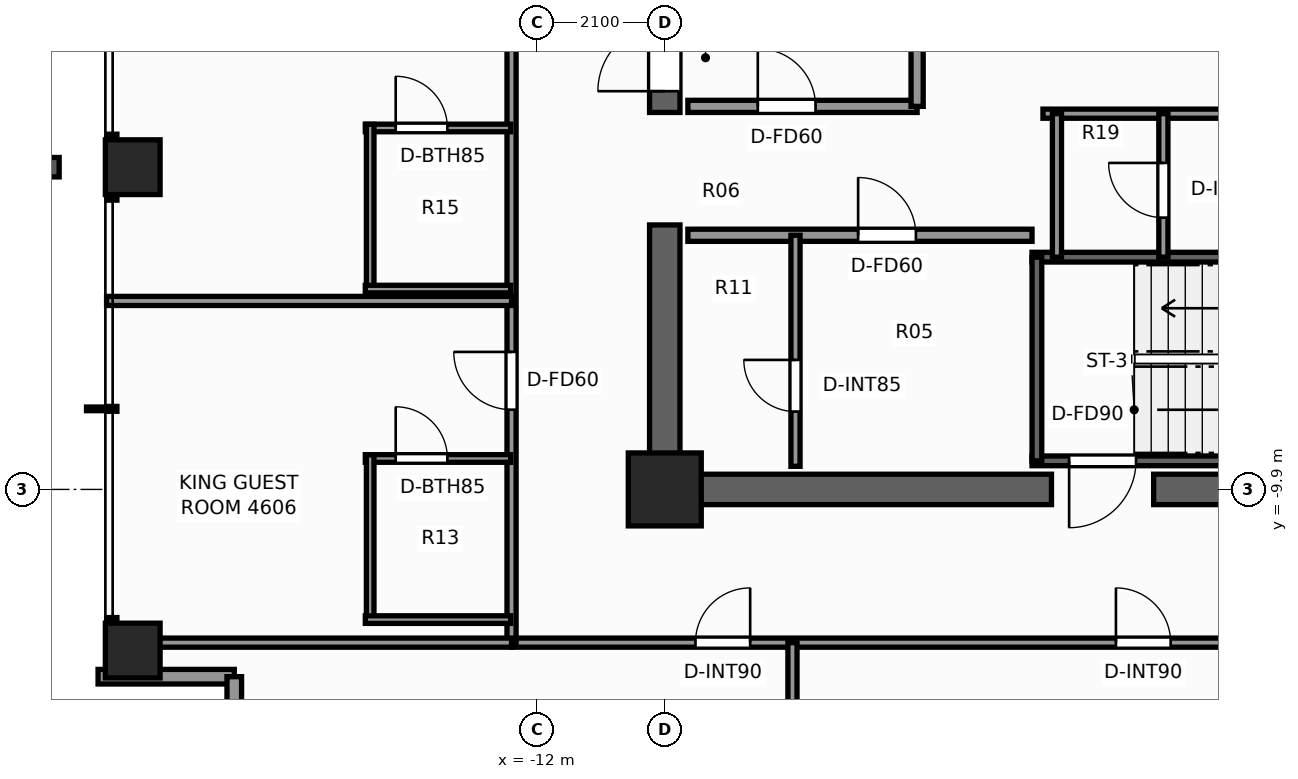
"""IFC4 building model, lengths in metres.
Left out: names, types, materials, properties, quantities, classifications, styles, units other than length and angle.
Written with IfcOpenShell. Run it as: python <this file> out.ifc"""

import sys

from ifc_helpers import new_model, si_unit, direction, frame, frame_2d, origin, origin_2d, place, context, subcontext, project, spatial, rectangle, extrude, element, fill, save


model = new_model("IFC4")
c1 = context("Model", 3, precision=1e-05, world=origin(), true_north=direction((0.0, 1.0)))
c2 = subcontext(c1, "Body", "Model", "MODEL_VIEW")
j1 = project(units=[si_unit("LENGTHUNIT", "METRE"), si_unit("PLANEANGLEUNIT", "RADIAN")], contexts=[c1])
p1 = place(None, origin())
s1 = spatial("IfcSite", under=j1, at=p1, CompositionType="ELEMENT")
p2 = place(p1, origin())
s2 = spatial("IfcBuilding", under=s1, at=p2, CompositionType="ELEMENT")
p3 = place(p2, frame((0.0, 0.0, 160.2)))
s3 = spatial("IfcBuildingStorey", under=s2, at=p3, CompositionType="ELEMENT", Elevation=160.2)
p4 = place(p3, frame((10.15, -9.9, 0.0), z_axis=(0.0, 0.0, 1.0), x_axis=(-1.0, 0.0, 0.0)))
e1 = element("IfcWall", 1, at=p4, inside=s3, PredefinedType="SHEAR", context=c2, shape_type="SweptSolid", body=[
    extrude(rectangle(XDim=12.01, YDim=0.5, at=frame_2d((6.005, 0.0))), origin(), (0.0, 0.0, 1.0), 3.3),
])
p5 = place(p3, frame((-3.54, -9.9, 0.0), z_axis=(0.0, 0.0, 1.0), x_axis=(-1.0, 0.0, 0.0)))
e2 = element("IfcWall", 2, at=p5, inside=s3, PredefinedType="SHEAR", context=c2, shape_type="SweptSolid", body=[
    extrude(rectangle(XDim=6.61, YDim=0.5, at=frame_2d((3.305, 0.0))), origin(), (0.0, 0.0, 1.0), 3.3),
])
p6 = place(p3, frame((-9.9, -9.65, 0.0), z_axis=(0.0, 0.0, 1.0), x_axis=(0.0, 1.0, 0.0)))
e3 = element("IfcWall", 3, at=p6, inside=s3, PredefinedType="SHEAR", context=c2, shape_type="SweptSolid", body=[
    extrude(rectangle(XDim=4.1, YDim=0.5, at=frame_2d((2.05, 0.0))), origin(), (0.0, 0.0, 1.0), 3.3),
])
p7 = place(p3, frame((-9.9, -3.7, 0.0), z_axis=(0.0, 0.0, 1.0), x_axis=(0.0, 1.0, 0.0)))
e4 = element("IfcWall", 4, at=p7, inside=s3, PredefinedType="SHEAR", context=c2, shape_type="SweptSolid", body=[
    extrude(rectangle(XDim=13.35, YDim=0.5, at=frame_2d((6.675, 0.0))), origin(), (0.0, 0.0, 1.0), 3.3),
])
p8 = place(p7, frame((0.35, 0.0, 0.0)))
e5 = element("IfcOpeningElement", 5, at=p8, cuts=e4, PredefinedType="OPENING", context=c2, shape_type="SweptSolid", body=[
    extrude(rectangle(XDim=1.1, YDim=2.2, at=frame_2d((0.55, 1.1))), frame((0.0, 0.26, 0.0), z_axis=(0.0, -1.0, 0.0), x_axis=(1.0, 0.0, 0.0)), (0.0, 0.0, 1.0), 0.52),
])
p9 = place(p3, frame((-9.9, -9.9, 0.0), z_axis=(0.0, 0.0, 1.0), x_axis=(1.0, 0.0, 0.0)))
e6 = element("IfcColumn", 6, at=p9, inside=s3, PredefinedType="COLUMN", context=c2, shape_type="SweptSolid", body=[
    extrude(rectangle(XDim=1.2, YDim=1.2, at=origin_2d()), origin(), (0.0, 0.0, 1.0), 3.3),
])
for number, where, z_axis, x_axis in (
    (7, (-18.65, -12.55, 0.0), (0.0, 0.0, 1.0), (1.0, 0.0, 0.0)),
    (8, (-18.65, -4.6, 0.0), (0.0, 0.0, 1.0), (1.0, 0.0, 0.0)),
):
    element("IfcColumn", number, at=place(p3, frame(where, z_axis=z_axis, x_axis=x_axis)), inside=s3, PredefinedType="COLUMN", context=c2, shape_type="SweptSolid", body=[
        extrude(rectangle(XDim=0.9, YDim=0.9, at=origin_2d()), origin(), (0.0, 0.0, 1.0), 3.3),
    ])
p10 = place(p3, frame((-16.98, -12.98, 0.0), z_axis=(0.0, 0.0, 1.0), x_axis=(-1.0, 0.0, 0.0)))
e9 = element("IfcWall", 9, at=p10, inside=s3, PredefinedType="STANDARD", context=c2, shape_type="SweptSolid", body=[
    extrude(rectangle(XDim=2.24, YDim=0.24, at=frame_2d((1.12, 0.0))), origin(), (0.0, 0.0, 1.0), 2.483),
])
p11 = place(p3, frame((-16.98, -15.22, 0.0), z_axis=(0.0, 0.0, 1.0), x_axis=(0.0, 1.0, 0.0)))
e10 = element("IfcWall", 10, at=p11, inside=s3, PredefinedType="STANDARD", context=c2, shape_type="SweptSolid", body=[
    extrude(rectangle(XDim=2.24, YDim=0.24, at=frame_2d((1.12, 0.0))), origin(), (0.0, 0.0, 1.0), 2.483),
])
p12 = place(p11, frame((0.45, 0.0, 0.65)))
e11 = element("IfcOpeningElement", 11, at=p12, cuts=e10, PredefinedType="OPENING", context=c2, shape_type="SweptSolid", body=[
    extrude(rectangle(XDim=1.1, YDim=1.45, at=frame_2d((0.55, 0.725))), frame((0.0, 0.13, 0.0), z_axis=(0.0, -1.0, 0.0), x_axis=(1.0, 0.0, 0.0)), (0.0, 0.0, 1.0), 0.26),
])
p13 = place(p3, frame((3.86, -9.43, 0.0), z_axis=(0.0, 0.0, 1.0), x_axis=(-1.0, 0.0, 0.0)))
e12 = element("IfcWall", 12, at=p13, inside=s3, PredefinedType="SHEAR", context=c2, shape_type="SweptSolid", body=[
    extrude(rectangle(XDim=7.72, YDim=0.16, at=frame_2d((3.86, 0.0))), origin(), (0.0, 0.0, 1.0), 3.3),
])
p14 = place(p13, frame((6.01, 0.0, 0.0)))
e13 = element("IfcOpeningElement", 13, at=p14, cuts=e12, PredefinedType="OPENING", context=c2, shape_type="SweptSolid", body=[
    extrude(rectangle(XDim=1.1, YDim=2.2, at=frame_2d((0.55, 1.1))), frame((0.0, 0.09, 0.0), z_axis=(0.0, -1.0, 0.0), x_axis=(1.0, 0.0, 0.0)), (0.0, 0.0, 1.0), 0.18),
])
p15 = place(p3, frame((-3.86, -6.08, 0.0), z_axis=(0.0, 0.0, 1.0), x_axis=(1.0, 0.0, 0.0)))
e14 = element("IfcWall", 14, at=p15, inside=s3, PredefinedType="SHEAR", context=c2, shape_type="SweptSolid", body=[
    extrude(rectangle(XDim=7.72, YDim=0.16, at=frame_2d((3.86, 0.0))), origin(), (0.0, 0.0, 1.0), 3.3),
])
p16 = place(p3, frame((-3.78, -9.43, 0.0), z_axis=(0.0, 0.0, 1.0), x_axis=(0.0, 1.0, 0.0)))
e15 = element("IfcWall", 15, at=p16, inside=s3, PredefinedType="SHEAR", context=c2, shape_type="SweptSolid", body=[
    extrude(rectangle(XDim=3.35, YDim=0.16, at=frame_2d((1.675, 0.0))), origin(), (0.0, 0.0, 1.0), 3.3),
])
p17 = place(p3, frame((-9.52, -3.6, 0.0), z_axis=(0.0, 0.0, 1.0), x_axis=(1.0, 0.0, 0.0)))
e16 = element("IfcWall", 16, at=p17, inside=s3, PredefinedType="SOLIDWALL", context=c2, shape_type="SweptSolid", body=[
    extrude(rectangle(XDim=3.77, YDim=0.2, at=frame_2d((1.885, 0.0))), origin(), (0.0, 0.0, 1.0), 3.1),
])
p18 = place(p17, frame((1.15, 0.0, 0.0)))
e17 = element("IfcOpeningElement", 17, at=p18, cuts=e16, PredefinedType="OPENING", context=c2, shape_type="SweptSolid", body=[
    extrude(rectangle(XDim=0.95, YDim=2.06, at=frame_2d((0.475, 1.03))), frame((0.0, 0.11, 0.0), z_axis=(0.0, -1.0, 0.0), x_axis=(1.0, 0.0, 0.0)), (0.0, 0.0, 1.0), 0.22),
])
p19 = place(p3, frame((-5.75, -3.6, 0.0), z_axis=(0.0, 0.0, 1.0), x_axis=(0.0, 1.0, 0.0)))
e18 = element("IfcWall", 18, at=p19, inside=s3, PredefinedType="SOLIDWALL", context=c2, shape_type="SweptSolid", body=[
    extrude(rectangle(XDim=5.57, YDim=0.2, at=frame_2d((2.785, 0.0))), origin(), (0.0, 0.0, 1.0), 2.735),
])
p20 = place(p19, frame((2.75, 0.0, 0.0)))
e19 = element("IfcOpeningElement", 19, at=p20, cuts=e18, PredefinedType="OPENING", context=c2, shape_type="SweptSolid", body=[
    extrude(rectangle(XDim=1.1, YDim=2.2, at=frame_2d((0.55, 1.1))), frame((0.0, 0.11, 0.0), z_axis=(0.0, -1.0, 0.0), x_axis=(1.0, 0.0, 0.0)), (0.0, 0.0, 1.0), 0.22),
])
p21 = place(p3, frame((-9.52, -5.72, 0.0), z_axis=(0.0, 0.0, 1.0), x_axis=(1.0, 0.0, 0.0)))
e20 = element("IfcWall", 20, at=p21, inside=s3, PredefinedType="SOLIDWALL", context=c2, shape_type="SweptSolid", body=[
    extrude(rectangle(XDim=5.66, YDim=0.2, at=frame_2d((2.83, 0.0))), origin(), (0.0, 0.0, 1.0), 3.1),
])
p22 = place(p21, frame((2.8, 0.0, 0.0)))
e21 = element("IfcOpeningElement", 21, at=p22, cuts=e20, PredefinedType="OPENING", context=c2, shape_type="SweptSolid", body=[
    extrude(rectangle(XDim=0.95, YDim=2.06, at=frame_2d((0.475, 1.03))), frame((0.0, 0.11, 0.0), z_axis=(0.0, -1.0, 0.0), x_axis=(1.0, 0.0, 0.0)), (0.0, 0.0, 1.0), 0.22),
])
p23 = place(p3, frame((-7.75, -9.52, 0.0), z_axis=(0.0, 0.0, 1.0), x_axis=(0.0, 1.0, 0.0)))
e22 = element("IfcWall", 22, at=p23, inside=s3, PredefinedType="PARTITIONING", context=c2, shape_type="SweptSolid", body=[
    extrude(rectangle(XDim=3.8, YDim=0.15, at=frame_2d((1.9, 0.0))), origin(), (0.0, 0.0, 1.0), 3.1),
])
p24 = place(p23, frame((0.9, 0.0, 0.0)))
e23 = element("IfcOpeningElement", 23, at=p24, cuts=e22, PredefinedType="OPENING", context=c2, shape_type="SweptSolid", body=[
    extrude(rectangle(XDim=0.85, YDim=2.03, at=frame_2d((0.425, 1.015))), frame((0.0, 0.085, 0.0), z_axis=(0.0, -1.0, 0.0), x_axis=(1.0, 0.0, 0.0)), (0.0, 0.0, 1.0), 0.17),
])
p25 = place(p3, frame((-3.68, -3.72, 0.0), z_axis=(0.0, 0.0, 1.0), x_axis=(1.0, 0.0, 0.0)))
e24 = element("IfcWall", 24, at=p25, inside=s3, PredefinedType="PARTITIONING", context=c2, shape_type="SweptSolid", body=[
    extrude(rectangle(XDim=7.36, YDim=0.15, at=frame_2d((3.68, 0.0))), origin(), (0.0, 0.0, 1.0), 3.1),
])
p26 = place(p3, frame((-3.45, -6.08, 0.0), z_axis=(0.0, 0.0, 1.0), x_axis=(0.0, 1.0, 0.0)))
e25 = element("IfcWall", 25, at=p26, inside=s3, PredefinedType="PARTITIONING", context=c2, shape_type="SweptSolid", body=[
    extrude(rectangle(XDim=2.36, YDim=0.15, at=frame_2d((1.18, 0.0))), origin(), (0.0, 0.0, 1.0), 3.1),
])
p27 = place(p3, frame((-1.7, -6.08, 0.0), z_axis=(0.0, 0.0, 1.0), x_axis=(0.0, 1.0, 0.0)))
e26 = element("IfcWall", 26, at=p27, inside=s3, PredefinedType="PARTITIONING", context=c2, shape_type="SweptSolid", body=[
    extrude(rectangle(XDim=2.36, YDim=0.15, at=frame_2d((1.18, 0.0))), origin(), (0.0, 0.0, 1.0), 3.1),
])
p28 = place(p27, frame((0.65, 0.0, 0.0)))
e27 = element("IfcOpeningElement", 27, at=p28, cuts=e26, PredefinedType="OPENING", context=c2, shape_type="SweptSolid", body=[
    extrude(rectangle(XDim=0.9, YDim=2.06, at=frame_2d((0.45, 1.03))), frame((0.0, 0.085, 0.0), z_axis=(0.0, -1.0, 0.0), x_axis=(1.0, 0.0, 0.0)), (0.0, 0.0, 1.0), 0.17),
])
p29 = place(p3, frame((-12.42, -12.42, 0.0), z_axis=(0.0, 0.0, 1.0), x_axis=(1.0, 0.0, 0.0)))
e28 = element("IfcWall", 28, at=p29, inside=s3, PredefinedType="PARTITIONING", context=c2, shape_type="SweptSolid", body=[
    extrude(rectangle(XDim=24.84, YDim=0.15, at=frame_2d((12.42, 0.0))), origin(), (0.0, 0.0, 1.0), 2.389),
])
p30 = place(p29, frame((3.024, 0.0, 0.0)))
e29 = element("IfcOpeningElement", 29, at=p30, cuts=e28, PredefinedType="OPENING", context=c2, shape_type="SweptSolid", body=[
    extrude(rectangle(XDim=0.9, YDim=2.06, at=frame_2d((0.45, 1.03))), frame((0.0, 0.085, 0.0), z_axis=(0.0, -1.0, 0.0), x_axis=(1.0, 0.0, 0.0)), (0.0, 0.0, 1.0), 0.17),
])
p31 = place(p29, frame((9.94, 0.0, 0.0)))
e30 = element("IfcOpeningElement", 30, at=p31, cuts=e28, PredefinedType="OPENING", context=c2, shape_type="SweptSolid", body=[
    extrude(rectangle(XDim=0.9, YDim=2.06, at=frame_2d((0.45, 1.03))), frame((0.0, 0.085, 0.0), z_axis=(0.0, -1.0, 0.0), x_axis=(1.0, 0.0, 0.0)), (0.0, 0.0, 1.0), 0.17),
])
p32 = place(p29, frame((15.224, 0.0, 0.0)))
e31 = element("IfcOpeningElement", 31, at=p32, cuts=e28, PredefinedType="OPENING", context=c2, shape_type="SweptSolid", body=[
    extrude(rectangle(XDim=0.9, YDim=2.06, at=frame_2d((0.45, 1.03))), frame((0.0, 0.085, 0.0), z_axis=(0.0, -1.0, 0.0), x_axis=(1.0, 0.0, 0.0)), (0.0, 0.0, 1.0), 0.17),
])
p33 = place(p29, frame((18.466, 0.0, 0.0)))
e32 = element("IfcOpeningElement", 32, at=p33, cuts=e28, PredefinedType="OPENING", context=c2, shape_type="SweptSolid", body=[
    extrude(rectangle(XDim=0.95, YDim=2.06, at=frame_2d((0.475, 1.03))), frame((0.0, 0.085, 0.0), z_axis=(0.0, -1.0, 0.0), x_axis=(1.0, 0.0, 0.0)), (0.0, 0.0, 1.0), 0.17),
])
p34 = place(p29, frame((20.916, 0.0, 0.0)))
e33 = element("IfcOpeningElement", 33, at=p34, cuts=e28, PredefinedType="OPENING", context=c2, shape_type="SweptSolid", body=[
    extrude(rectangle(XDim=0.9, YDim=2.06, at=frame_2d((0.45, 1.03))), frame((0.0, 0.085, 0.0), z_axis=(0.0, -1.0, 0.0), x_axis=(1.0, 0.0, 0.0)), (0.0, 0.0, 1.0), 0.17),
])
p35 = place(p3, frame((-12.42, -12.42, 0.0), z_axis=(0.0, 0.0, 1.0), x_axis=(0.0, 1.0, 0.0)))
e34 = element("IfcWall", 34, at=p35, inside=s3, PredefinedType="PARTITIONING", context=c2, shape_type="SweptSolid", body=[
    extrude(rectangle(XDim=24.84, YDim=0.15, at=frame_2d((12.42, 0.0))), origin(), (0.0, 0.0, 1.0), 2.389),
])
p36 = place(p35, frame((3.831, 0.0, 0.0)))
e35 = element("IfcOpeningElement", 35, at=p36, cuts=e34, PredefinedType="OPENING", context=c2, shape_type="SweptSolid", body=[
    extrude(rectangle(XDim=0.95, YDim=2.06, at=frame_2d((0.475, 1.03))), frame((0.0, 0.085, 0.0), z_axis=(0.0, -1.0, 0.0), x_axis=(1.0, 0.0, 0.0)), (0.0, 0.0, 1.0), 0.17),
])
p37 = place(p35, frame((10.012, 0.0, 0.0)))
e36 = element("IfcOpeningElement", 36, at=p37, cuts=e34, PredefinedType="OPENING", context=c2, shape_type="SweptSolid", body=[
    extrude(rectangle(XDim=0.95, YDim=2.06, at=frame_2d((0.475, 1.03))), frame((0.0, 0.085, 0.0), z_axis=(0.0, -1.0, 0.0), x_axis=(1.0, 0.0, 0.0)), (0.0, 0.0, 1.0), 0.17),
])
p38 = place(p35, frame((19.504, 0.0, 0.0)))
e37 = element("IfcOpeningElement", 37, at=p38, cuts=e34, PredefinedType="OPENING", context=c2, shape_type="SweptSolid", body=[
    extrude(rectangle(XDim=0.95, YDim=2.06, at=frame_2d((0.475, 1.03))), frame((0.0, 0.085, 0.0), z_axis=(0.0, -1.0, 0.0), x_axis=(1.0, 0.0, 0.0)), (0.0, 0.0, 1.0), 0.17),
])
p39 = place(p3, frame((-19.08, -12.42, 0.0), z_axis=(0.0, 0.0, 1.0), x_axis=(1.0, 0.0, 0.0)))
e38 = element("IfcWall", 38, at=p39, inside=s3, PredefinedType="PARTITIONING", context=c2, shape_type="SweptSolid", body=[
    extrude(rectangle(XDim=6.66, YDim=0.15, at=frame_2d((3.33, 0.0))), origin(), (0.0, 0.0, 1.0), 2.389),
])
for number, where, z_axis, x_axis in (
    (39, (-7.8, -19.08, 0.0), (0.0, 0.0, 1.0), (0.0, 1.0, 0.0)),
    (40, (-19.08, -6.8, 0.0), (0.0, 0.0, 1.0), (1.0, 0.0, 0.0)),
):
    element("IfcWall", number, at=place(p3, frame(where, z_axis=z_axis, x_axis=x_axis)), inside=s3, PredefinedType="PARTITIONING", context=c2, shape_type="SweptSolid", body=[
        extrude(rectangle(XDim=6.66, YDim=0.15, at=frame_2d((3.33, 0.0))), origin(), (0.0, 0.0, 1.0), 2.473),
    ])
p40 = place(p3, frame((-14.825, -9.391, 0.0), z_axis=(0.0, 0.0, 1.0), x_axis=(1.0, 0.0, 0.0)))
e41 = element("IfcWall", 41, at=p40, inside=s3, PredefinedType="PARTITIONING", context=c2, shape_type="SweptSolid", body=[
    extrude(rectangle(XDim=2.39, YDim=0.125, at=frame_2d((1.195, 0.0))), origin(), (0.0, 0.0, 1.0), 3.1),
])
p41 = place(p40, frame((0.5, 0.0, 0.0)))
e42 = element("IfcOpeningElement", 42, at=p41, cuts=e41, PredefinedType="OPENING", context=c2, shape_type="SweptSolid", body=[
    extrude(rectangle(XDim=0.85, YDim=2.03, at=frame_2d((0.425, 1.015))), frame((0.0, 0.073, 0.0), z_axis=(0.0, -1.0, 0.0), x_axis=(1.0, 0.0, 0.0)), (0.0, 0.0, 1.0), 0.145),
])
p42 = place(p3, frame((-14.745, -12.101, 0.0), z_axis=(0.0, 0.0, 1.0), x_axis=(0.0, 1.0, 0.0)))
e43 = element("IfcWall", 43, at=p42, inside=s3, PredefinedType="PARTITIONING", context=c2, shape_type="SweptSolid", body=[
    extrude(rectangle(XDim=2.77, YDim=0.125, at=frame_2d((1.385, 0.0))), origin(), (0.0, 0.0, 1.0), 2.389),
])
p43 = place(p3, frame((-14.825, -12.041, 0.0), z_axis=(0.0, 0.0, 1.0), x_axis=(1.0, 0.0, 0.0)))
e44 = element("IfcWall", 44, at=p43, inside=s3, PredefinedType="PARTITIONING", context=c2, shape_type="SweptSolid", body=[
    extrude(rectangle(XDim=2.39, YDim=0.125, at=frame_2d((1.195, 0.0))), origin(), (0.0, 0.0, 1.0), 3.1),
])
p44 = place(p3, frame((-14.825, -3.955, 0.0), z_axis=(0.0, 0.0, 1.0), x_axis=(1.0, 0.0, 0.0)))
e45 = element("IfcWall", 45, at=p44, inside=s3, PredefinedType="PARTITIONING", context=c2, shape_type="SweptSolid", body=[
    extrude(rectangle(XDim=2.39, YDim=0.125, at=frame_2d((1.195, 0.0))), origin(), (0.0, 0.0, 1.0), 3.1),
])
p45 = place(p44, frame((0.5, 0.0, 0.0)))
e46 = element("IfcOpeningElement", 46, at=p45, cuts=e45, PredefinedType="OPENING", context=c2, shape_type="SweptSolid", body=[
    extrude(rectangle(XDim=0.85, YDim=2.03, at=frame_2d((0.425, 1.015))), frame((0.0, 0.073, 0.0), z_axis=(0.0, -1.0, 0.0), x_axis=(1.0, 0.0, 0.0)), (0.0, 0.0, 1.0), 0.145),
])
p46 = place(p3, frame((-14.745, -6.665, 0.0), z_axis=(0.0, 0.0, 1.0), x_axis=(0.0, 1.0, 0.0)))
e47 = element("IfcWall", 47, at=p46, inside=s3, PredefinedType="PARTITIONING", context=c2, shape_type="SweptSolid", body=[
    extrude(rectangle(XDim=2.77, YDim=0.125, at=frame_2d((1.385, 0.0))), origin(), (0.0, 0.0, 1.0), 2.389),
])
p47 = place(p3, frame((-14.825, -6.605, 0.0), z_axis=(0.0, 0.0, 1.0), x_axis=(1.0, 0.0, 0.0)))
e48 = element("IfcWall", 48, at=p47, inside=s3, PredefinedType="PARTITIONING", context=c2, shape_type="SweptSolid", body=[
    extrude(rectangle(XDim=2.39, YDim=0.125, at=frame_2d((1.195, 0.0))), origin(), (0.0, 0.0, 1.0), 3.1),
])
p48 = place(p14, origin())
e49 = element("IfcDoor", 49, at=p48, inside=s3, OperationType="SINGLE_SWING_RIGHT", PredefinedType="DOOR", context=c2, shape_type="SweptSolid", body=[
    extrude(rectangle(XDim=1.1, YDim=2.2, at=frame_2d((0.55, 1.1))), frame((0.0, 0.025, 0.0), z_axis=(0.0, -1.0, 0.0), x_axis=(1.0, 0.0, 0.0)), (0.0, 0.0, 1.0), 0.05),
])
fill(e13, e49)
p49 = place(p8, origin())
e50 = element("IfcDoor", 50, at=p49, inside=s3, OperationType="SINGLE_SWING_LEFT", PredefinedType="DOOR", context=c2, shape_type="SweptSolid", body=[
    extrude(rectangle(XDim=1.1, YDim=2.2, at=frame_2d((0.55, 1.1))), frame((0.0, 0.025, 0.0), z_axis=(0.0, -1.0, 0.0), x_axis=(1.0, 0.0, 0.0)), (0.0, 0.0, 1.0), 0.05),
])
fill(e5, e50)
p50 = place(p22, origin())
e51 = element("IfcDoor", 51, at=p50, inside=s3, OperationType="SINGLE_SWING_LEFT", PredefinedType="DOOR", context=c2, shape_type="SweptSolid", body=[
    extrude(rectangle(XDim=0.95, YDim=2.06, at=frame_2d((0.475, 1.03))), frame((0.0, 0.025, 0.0), z_axis=(0.0, -1.0, 0.0), x_axis=(1.0, 0.0, 0.0)), (0.0, 0.0, 1.0), 0.05),
])
fill(e21, e51)
p51 = place(p24, origin())
e52 = element("IfcDoor", 52, at=p51, inside=s3, OperationType="SINGLE_SWING_RIGHT", PredefinedType="DOOR", context=c2, shape_type="SweptSolid", body=[
    extrude(rectangle(XDim=0.85, YDim=2.03, at=frame_2d((0.425, 1.015))), frame((0.0, 0.025, 0.0), z_axis=(0.0, -1.0, 0.0), x_axis=(1.0, 0.0, 0.0)), (0.0, 0.0, 1.0), 0.05),
])
fill(e23, e52)
p52 = place(p18, origin())
e53 = element("IfcDoor", 53, at=p52, inside=s3, OperationType="SINGLE_SWING_LEFT", PredefinedType="DOOR", context=c2, shape_type="SweptSolid", body=[
    extrude(rectangle(XDim=0.95, YDim=2.06, at=frame_2d((0.475, 1.03))), frame((0.0, 0.025, 0.0), z_axis=(0.0, -1.0, 0.0), x_axis=(1.0, 0.0, 0.0)), (0.0, 0.0, 1.0), 0.05),
])
fill(e17, e53)
p53 = place(p28, origin())
e54 = element("IfcDoor", 54, at=p53, inside=s3, OperationType="SINGLE_SWING_RIGHT", PredefinedType="DOOR", context=c2, shape_type="SweptSolid", body=[
    extrude(rectangle(XDim=0.9, YDim=2.06, at=frame_2d((0.45, 1.03))), frame((0.0, 0.025, 0.0), z_axis=(0.0, -1.0, 0.0), x_axis=(1.0, 0.0, 0.0)), (0.0, 0.0, 1.0), 0.05),
])
fill(e27, e54)
p54 = place(p30, origin())
e55 = element("IfcDoor", 55, at=p54, inside=s3, OperationType="SINGLE_SWING_RIGHT", PredefinedType="DOOR", context=c2, shape_type="SweptSolid", body=[
    extrude(rectangle(XDim=0.9, YDim=2.06, at=frame_2d((0.45, 1.03))), frame((0.0, 0.025, 0.0), z_axis=(0.0, -1.0, 0.0), x_axis=(1.0, 0.0, 0.0)), (0.0, 0.0, 1.0), 0.05),
])
fill(e29, e55)
p55 = place(p31, origin())
e56 = element("IfcDoor", 56, at=p55, inside=s3, OperationType="SINGLE_SWING_LEFT", PredefinedType="DOOR", context=c2, shape_type="SweptSolid", body=[
    extrude(rectangle(XDim=0.9, YDim=2.06, at=frame_2d((0.45, 1.03))), frame((0.0, 0.025, 0.0), z_axis=(0.0, -1.0, 0.0), x_axis=(1.0, 0.0, 0.0)), (0.0, 0.0, 1.0), 0.05),
])
fill(e30, e56)
p56 = place(p41, origin())
e57 = element("IfcDoor", 57, at=p56, inside=s3, OperationType="SINGLE_SWING_LEFT", PredefinedType="DOOR", context=c2, shape_type="SweptSolid", body=[
    extrude(rectangle(XDim=0.85, YDim=2.03, at=frame_2d((0.425, 1.015))), frame((0.0, 0.025, 0.0), z_axis=(0.0, -1.0, 0.0), x_axis=(1.0, 0.0, 0.0)), (0.0, 0.0, 1.0), 0.05),
])
fill(e42, e57)
p57 = place(p36, origin())
e58 = element("IfcDoor", 58, at=p57, inside=s3, OperationType="SINGLE_SWING_RIGHT", PredefinedType="DOOR", context=c2, shape_type="SweptSolid", body=[
    extrude(rectangle(XDim=0.95, YDim=2.06, at=frame_2d((0.475, 1.03))), frame((0.0, 0.025, 0.0), z_axis=(0.0, -1.0, 0.0), x_axis=(1.0, 0.0, 0.0)), (0.0, 0.0, 1.0), 0.05),
])
fill(e35, e58)
p58 = place(p45, origin())
e59 = element("IfcDoor", 59, at=p58, inside=s3, OperationType="SINGLE_SWING_LEFT", PredefinedType="DOOR", context=c2, shape_type="SweptSolid", body=[
    extrude(rectangle(XDim=0.85, YDim=2.03, at=frame_2d((0.425, 1.015))), frame((0.0, 0.025, 0.0), z_axis=(0.0, -1.0, 0.0), x_axis=(1.0, 0.0, 0.0)), (0.0, 0.0, 1.0), 0.05),
])
fill(e46, e59)
save(model, sys.argv[1])
